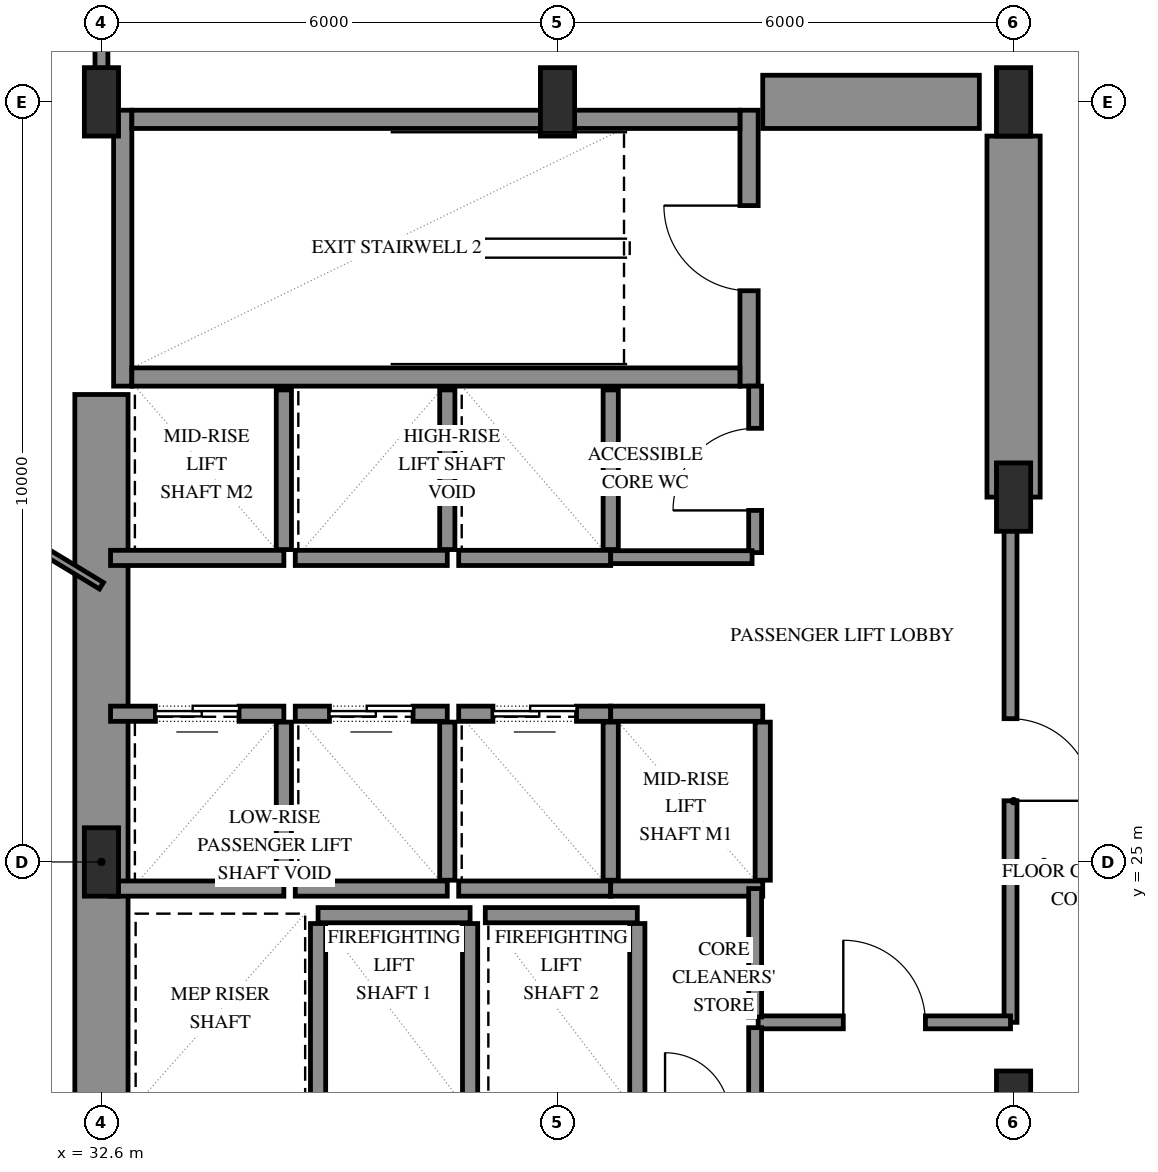
"""IFC4 building model, lengths in metres.
Left out: names, types, materials, properties, quantities, classifications, styles, units other than length and angle.
Written with IfcOpenShell. Run it as: python <this file> out.ifc"""

import sys

from ifc_helpers import new_model, si_unit, direction, frame, frame_2d, origin, origin_2d, place, context, subcontext, project, spatial, rectangle, extrude, element, fill, save


model = new_model("IFC4")
c1 = context("Model", 3, precision=1e-05, world=origin(), true_north=direction((0.0, 1.0)))
c2 = subcontext(c1, "Body", "Model", "MODEL_VIEW")
j1 = project(units=[si_unit("LENGTHUNIT", "METRE"), si_unit("PLANEANGLEUNIT", "RADIAN")], contexts=[c1])
p1 = place(None, origin())
s1 = spatial("IfcSite", under=j1, at=p1, CompositionType="ELEMENT")
p2 = place(p1, origin())
s2 = spatial("IfcBuilding", under=s1, at=p2, CompositionType="ELEMENT")
p3 = place(p2, frame((0.0, 0.0, 30.6)))
s3 = spatial("IfcBuildingStorey", under=s2, at=p3, CompositionType="ELEMENT", Elevation=30.6)
p4 = place(p3, frame((32.88, 31.26, 0.0), z_axis=(0.0, 0.0, 1.0), x_axis=(0.0, 1.0, 0.0)))
e1 = element("IfcWall", 1, at=p4, inside=s3, PredefinedType="SHEAR", context=c2, shape_type="SweptSolid", body=[
    extrude(rectangle(XDim=3.63, YDim=0.24, at=frame_2d((1.815, 0.0))), origin(), (0.0, 0.0, 1.0), 4.0),
])
p5 = place(p3, frame((41.12, 31.26, 0.0), z_axis=(0.0, 0.0, 1.0), x_axis=(0.0, 1.0, 0.0)))
e2 = element("IfcWall", 2, at=p5, inside=s3, PredefinedType="SHEAR", context=c2, shape_type="SweptSolid", body=[
    extrude(rectangle(XDim=3.63, YDim=0.24, at=frame_2d((1.815, 0.0))), origin(), (0.0, 0.0, 1.0), 4.0),
])
p6 = place(p5, frame((1.255, 0.0, 0.0)))
e3 = element("IfcOpeningElement", 3, at=p6, cuts=e2, PredefinedType="OPENING", context=c2, shape_type="SweptSolid", body=[
    extrude(rectangle(XDim=1.12, YDim=2.15, at=frame_2d((0.56, 1.075))), frame((0.0, 0.13, 0.0), z_axis=(0.0, -1.0, 0.0), x_axis=(1.0, 0.0, 0.0)), (0.0, 0.0, 1.0), 0.26),
])
for number, where, z_axis, x_axis in (
    (4, (33.0, 31.38, 0.0), (0.0, 0.0, 1.0), (1.0, 0.0, 0.0)),
    (5, (33.0, 34.77, 0.0), (0.0, 0.0, 1.0), (1.0, 0.0, 0.0)),
):
    element("IfcWall", number, at=place(p3, frame(where, z_axis=z_axis, x_axis=x_axis)), inside=s3, PredefinedType="SHEAR", context=c2, shape_type="SweptSolid", body=[
        extrude(rectangle(XDim=8.0, YDim=0.24, at=frame_2d((4.0, 0.0))), origin(), (0.0, 0.0, 1.0), 4.0),
    ])
p7 = place(p3, frame((32.6, 18.85, 0.0), z_axis=(0.0, 0.0, 1.0), x_axis=(0.0, 1.0, 0.0)))
e6 = element("IfcWall", 6, at=p7, inside=s3, PredefinedType="SHEAR", context=c2, shape_type="SweptSolid", body=[
    extrude(rectangle(XDim=12.3, YDim=0.7, at=frame_2d((6.15, 0.0))), origin(), (0.0, 0.0, 1.0), 4.0),
])
p8 = place(p3, frame((41.3, 35.0, 0.0), z_axis=(0.0, 0.0, 1.0), x_axis=(1.0, 0.0, 0.0)))
e7 = element("IfcWall", 7, at=p8, inside=s3, PredefinedType="SHEAR", context=c2, shape_type="SweptSolid", body=[
    extrude(rectangle(XDim=2.85, YDim=0.7, at=frame_2d((1.425, 0.0))), origin(), (0.0, 0.0, 1.0), 4.0),
])
p9 = place(p3, frame((44.6, 29.8, 0.0), z_axis=(0.0, 0.0, 1.0), x_axis=(0.0, 1.0, 0.0)))
e8 = element("IfcWall", 8, at=p9, inside=s3, PredefinedType="SHEAR", context=c2, shape_type="SweptSolid", body=[
    extrude(rectangle(XDim=4.75, YDim=0.7, at=frame_2d((2.375, 0.0))), origin(), (0.0, 0.0, 1.0), 4.0),
])
for number, where, z_axis, x_axis in (
    (9, (32.6, 25.0, -0.3), (0.0, 0.0, 1.0), (1.0, 0.0, 0.0)),
    (10, (32.6, 35.0, -0.3), (0.0, 0.0, 1.0), (1.0, 0.0, 0.0)),
    (11, (38.6, 35.0, -0.3), (0.0, 0.0, 1.0), (1.0, 0.0, 0.0)),
    (12, (44.6, 21.8, -0.3), (0.0, 0.0, 1.0), (1.0, 0.0, 0.0)),
    (13, (44.6, 29.8, -0.3), (0.0, 0.0, 1.0), (1.0, 0.0, 0.0)),
    (14, (44.6, 35.0, -0.3), (0.0, 0.0, 1.0), (1.0, 0.0, 0.0)),
):
    element("IfcColumn", number, at=place(p3, frame(where, z_axis=z_axis, x_axis=x_axis)), inside=s3, PredefinedType="PILASTER", context=c2, shape_type="SweptSolid", body=[
        extrude(rectangle(XDim=0.45, YDim=0.9, at=origin_2d()), origin(), (0.0, 0.0, 1.0), 4.3),
    ])
p10 = place(p3, frame((35.45, 24.3, 0.0), z_axis=(0.0, 0.0, 1.0), x_axis=(1.0, 0.0, 0.0)))
e15 = element("IfcWall", 15, at=p10, inside=s3, PredefinedType="SOLIDWALL", context=c2, shape_type="SweptSolid", body=[
    extrude(rectangle(XDim=2.0, YDim=0.2, at=frame_2d((1.0, 0.0))), origin(), (0.0, 0.0, 1.0), 3.7),
])
for number, where, z_axis, x_axis in (
    (16, (35.45, 21.81, 0.0), (0.0, 0.0, 1.0), (0.0, 1.0, 0.0)),
    (17, (37.45, 21.81, 0.0), (0.0, 0.0, 1.0), (0.0, 1.0, 0.0)),
):
    element("IfcWall", number, at=place(p3, frame(where, z_axis=z_axis, x_axis=x_axis)), inside=s3, PredefinedType="SOLIDWALL", context=c2, shape_type="SweptSolid", body=[
        extrude(rectangle(XDim=2.38, YDim=0.2, at=frame_2d((1.19, 0.0))), origin(), (0.0, 0.0, 1.0), 3.7),
    ])
p11 = place(p3, frame((37.65, 24.3, 0.0), z_axis=(0.0, 0.0, 1.0), x_axis=(1.0, 0.0, 0.0)))
e18 = element("IfcWall", 18, at=p11, inside=s3, PredefinedType="SOLIDWALL", context=c2, shape_type="SweptSolid", body=[
    extrude(rectangle(XDim=2.0, YDim=0.2, at=frame_2d((1.0, 0.0))), origin(), (0.0, 0.0, 1.0), 3.7),
])
p12 = place(p3, frame((39.65, 21.81, 0.0), z_axis=(0.0, 0.0, 1.0), x_axis=(0.0, 1.0, 0.0)))
e19 = element("IfcWall", 19, at=p12, inside=s3, PredefinedType="SOLIDWALL", context=c2, shape_type="SweptSolid", body=[
    extrude(rectangle(XDim=2.38, YDim=0.2, at=frame_2d((1.19, 0.0))), origin(), (0.0, 0.0, 1.0), 3.7),
])
p13 = place(p3, frame((32.72, 24.65, 0.0), z_axis=(0.0, 0.0, 1.0), x_axis=(1.0, 0.0, 0.0)))
e20 = element("IfcWall", 20, at=p13, inside=s3, PredefinedType="SOLIDWALL", context=c2, shape_type="SweptSolid", body=[
    extrude(rectangle(XDim=2.28, YDim=0.2, at=frame_2d((1.14, 0.0))), origin(), (0.0, 0.0, 1.0), 3.7),
])
p14 = place(p3, frame((32.72, 26.95, 0.0), z_axis=(0.0, 0.0, 1.0), x_axis=(1.0, 0.0, 0.0)))
e21 = element("IfcWall", 21, at=p14, inside=s3, PredefinedType="SOLIDWALL", context=c2, shape_type="SweptSolid", body=[
    extrude(rectangle(XDim=2.28, YDim=0.2, at=frame_2d((1.14, 0.0))), origin(), (0.0, 0.0, 1.0), 3.7),
])
p15 = place(p14, frame((0.59, 0.0, 0.0)))
e22 = element("IfcOpeningElement", 22, at=p15, cuts=e21, PredefinedType="OPENING", context=c2, shape_type="SweptSolid", body=[
    extrude(rectangle(XDim=1.1, YDim=2.15, at=frame_2d((0.55, 1.075))), frame((0.0, 0.11, 0.0), z_axis=(0.0, -1.0, 0.0), x_axis=(1.0, 0.0, 0.0)), (0.0, 0.0, 1.0), 0.22),
])
p16 = place(p3, frame((35.0, 24.76, 0.0), z_axis=(0.0, 0.0, 1.0), x_axis=(0.0, 1.0, 0.0)))
e23 = element("IfcWall", 23, at=p16, inside=s3, PredefinedType="SOLIDWALL", context=c2, shape_type="SweptSolid", body=[
    extrude(rectangle(XDim=2.08, YDim=0.2, at=frame_2d((1.04, 0.0))), origin(), (0.0, 0.0, 1.0), 3.7),
])
p17 = place(p3, frame((35.15, 24.65, 0.0), z_axis=(0.0, 0.0, 1.0), x_axis=(1.0, 0.0, 0.0)))
e24 = element("IfcWall", 24, at=p17, inside=s3, PredefinedType="SOLIDWALL", context=c2, shape_type="SweptSolid", body=[
    extrude(rectangle(XDim=2.0, YDim=0.2, at=frame_2d((1.0, 0.0))), origin(), (0.0, 0.0, 1.0), 3.7),
])
p18 = place(p3, frame((35.15, 26.95, 0.0), z_axis=(0.0, 0.0, 1.0), x_axis=(1.0, 0.0, 0.0)))
e25 = element("IfcWall", 25, at=p18, inside=s3, PredefinedType="SOLIDWALL", context=c2, shape_type="SweptSolid", body=[
    extrude(rectangle(XDim=2.0, YDim=0.2, at=frame_2d((1.0, 0.0))), origin(), (0.0, 0.0, 1.0), 3.7),
])
p19 = place(p18, frame((0.45, 0.0, 0.0)))
e26 = element("IfcOpeningElement", 26, at=p19, cuts=e25, PredefinedType="OPENING", context=c2, shape_type="SweptSolid", body=[
    extrude(rectangle(XDim=1.1, YDim=2.15, at=frame_2d((0.55, 1.075))), frame((0.0, 0.11, 0.0), z_axis=(0.0, -1.0, 0.0), x_axis=(1.0, 0.0, 0.0)), (0.0, 0.0, 1.0), 0.22),
])
p20 = place(p3, frame((37.15, 24.76, 0.0), z_axis=(0.0, 0.0, 1.0), x_axis=(0.0, 1.0, 0.0)))
e27 = element("IfcWall", 27, at=p20, inside=s3, PredefinedType="SOLIDWALL", context=c2, shape_type="SweptSolid", body=[
    extrude(rectangle(XDim=2.08, YDim=0.2, at=frame_2d((1.04, 0.0))), origin(), (0.0, 0.0, 1.0), 3.7),
])
p21 = place(p3, frame((37.3, 24.65, 0.0), z_axis=(0.0, 0.0, 1.0), x_axis=(1.0, 0.0, 0.0)))
e28 = element("IfcWall", 28, at=p21, inside=s3, PredefinedType="SOLIDWALL", context=c2, shape_type="SweptSolid", body=[
    extrude(rectangle(XDim=2.0, YDim=0.2, at=frame_2d((1.0, 0.0))), origin(), (0.0, 0.0, 1.0), 3.7),
])
p22 = place(p3, frame((37.3, 26.95, 0.0), z_axis=(0.0, 0.0, 1.0), x_axis=(1.0, 0.0, 0.0)))
e29 = element("IfcWall", 29, at=p22, inside=s3, PredefinedType="SOLIDWALL", context=c2, shape_type="SweptSolid", body=[
    extrude(rectangle(XDim=2.0, YDim=0.2, at=frame_2d((1.0, 0.0))), origin(), (0.0, 0.0, 1.0), 3.7),
])
p23 = place(p22, frame((0.45, 0.0, 0.0)))
e30 = element("IfcOpeningElement", 30, at=p23, cuts=e29, PredefinedType="OPENING", context=c2, shape_type="SweptSolid", body=[
    extrude(rectangle(XDim=1.1, YDim=2.15, at=frame_2d((0.55, 1.075))), frame((0.0, 0.11, 0.0), z_axis=(0.0, -1.0, 0.0), x_axis=(1.0, 0.0, 0.0)), (0.0, 0.0, 1.0), 0.22),
])
p24 = place(p3, frame((39.3, 24.76, 0.0), z_axis=(0.0, 0.0, 1.0), x_axis=(0.0, 1.0, 0.0)))
e31 = element("IfcWall", 31, at=p24, inside=s3, PredefinedType="SOLIDWALL", context=c2, shape_type="SweptSolid", body=[
    extrude(rectangle(XDim=2.08, YDim=0.2, at=frame_2d((1.04, 0.0))), origin(), (0.0, 0.0, 1.0), 3.7),
])
for number, where, z_axis, x_axis in (
    (32, (39.3, 24.65, 0.0), (0.0, 0.0, 1.0), (1.0, 0.0, 0.0)),
    (33, (39.3, 26.95, 0.0), (0.0, 0.0, 1.0), (1.0, 0.0, 0.0)),
):
    element("IfcWall", number, at=place(p3, frame(where, z_axis=z_axis, x_axis=x_axis)), inside=s3, PredefinedType="SOLIDWALL", context=c2, shape_type="SweptSolid", body=[
        extrude(rectangle(XDim=2.0, YDim=0.2, at=frame_2d((1.0, 0.0))), origin(), (0.0, 0.0, 1.0), 3.7),
    ])
p25 = place(p3, frame((41.3, 24.76, 0.0), z_axis=(0.0, 0.0, 1.0), x_axis=(0.0, 1.0, 0.0)))
e34 = element("IfcWall", 34, at=p25, inside=s3, PredefinedType="SOLIDWALL", context=c2, shape_type="SweptSolid", body=[
    extrude(rectangle(XDim=2.08, YDim=0.2, at=frame_2d((1.04, 0.0))), origin(), (0.0, 0.0, 1.0), 3.7),
])
p26 = place(p3, frame((32.72, 29.0, 0.0), z_axis=(0.0, 0.0, 1.0), x_axis=(1.0, 0.0, 0.0)))
e35 = element("IfcWall", 35, at=p26, inside=s3, PredefinedType="SOLIDWALL", context=c2, shape_type="SweptSolid", body=[
    extrude(rectangle(XDim=2.28, YDim=0.2, at=frame_2d((1.14, 0.0))), origin(), (0.0, 0.0, 1.0), 3.7),
])
p27 = place(p3, frame((35.0, 29.11, 0.0), z_axis=(0.0, 0.0, 1.0), x_axis=(0.0, 1.0, 0.0)))
e36 = element("IfcWall", 36, at=p27, inside=s3, PredefinedType="SOLIDWALL", context=c2, shape_type="SweptSolid", body=[
    extrude(rectangle(XDim=2.1, YDim=0.2, at=frame_2d((1.05, 0.0))), origin(), (0.0, 0.0, 1.0), 3.7),
])
p28 = place(p3, frame((35.15, 29.0, 0.0), z_axis=(0.0, 0.0, 1.0), x_axis=(1.0, 0.0, 0.0)))
e37 = element("IfcWall", 37, at=p28, inside=s3, PredefinedType="SOLIDWALL", context=c2, shape_type="SweptSolid", body=[
    extrude(rectangle(XDim=2.0, YDim=0.2, at=frame_2d((1.0, 0.0))), origin(), (0.0, 0.0, 1.0), 3.7),
])
p29 = place(p3, frame((37.15, 29.11, 0.0), z_axis=(0.0, 0.0, 1.0), x_axis=(0.0, 1.0, 0.0)))
e38 = element("IfcWall", 38, at=p29, inside=s3, PredefinedType="SOLIDWALL", context=c2, shape_type="SweptSolid", body=[
    extrude(rectangle(XDim=2.1, YDim=0.2, at=frame_2d((1.05, 0.0))), origin(), (0.0, 0.0, 1.0), 3.7),
])
p30 = place(p3, frame((37.3, 29.0, 0.0), z_axis=(0.0, 0.0, 1.0), x_axis=(1.0, 0.0, 0.0)))
e39 = element("IfcWall", 39, at=p30, inside=s3, PredefinedType="SOLIDWALL", context=c2, shape_type="SweptSolid", body=[
    extrude(rectangle(XDim=2.0, YDim=0.2, at=frame_2d((1.0, 0.0))), origin(), (0.0, 0.0, 1.0), 3.7),
])
p31 = place(p3, frame((39.3, 29.11, 0.0), z_axis=(0.0, 0.0, 1.0), x_axis=(0.0, 1.0, 0.0)))
e40 = element("IfcWall", 40, at=p31, inside=s3, PredefinedType="SOLIDWALL", context=c2, shape_type="SweptSolid", body=[
    extrude(rectangle(XDim=2.1, YDim=0.2, at=frame_2d((1.05, 0.0))), origin(), (0.0, 0.0, 1.0), 3.7),
])
p32 = place(p3, frame((32.6, 28.634, 0.0), z_axis=(0.0, 0.0, 1.0), x_axis=(-0.855390028233, 0.517984458839, 0.0)))
e41 = element("IfcWall", 41, at=p32, inside=s3, PredefinedType="PARTITIONING", context=c2, shape_type="SweptSolid", body=[
    extrude(rectangle(XDim=7.863, YDim=0.1, at=frame_2d((3.932, 0.0))), origin(), (0.0, 0.0, 1.0), 3.074),
])
p33 = place(p3, frame((44.56, 29.8, 0.0), z_axis=(0.0, 0.0, 1.0), x_axis=(0.0, -1.0, 0.0)))
e42 = element("IfcWall", 42, at=p33, inside=s3, PredefinedType="PARTITIONING", context=c2, shape_type="SweptSolid", body=[
    extrude(rectangle(XDim=6.91, YDim=0.17, at=frame_2d((3.455, 0.0))), origin(), (0.0, 0.0, 1.0), 2.74),
])
p34 = place(p33, frame((2.915, 0.0, 0.0)))
e43 = element("IfcOpeningElement", 43, at=p34, cuts=e42, PredefinedType="OPENING", context=c2, shape_type="SweptSolid", body=[
    extrude(rectangle(XDim=1.08, YDim=2.15, at=frame_2d((0.54, 1.075))), frame((0.0, 0.095, 0.0), z_axis=(0.0, -1.0, 0.0), x_axis=(1.0, 0.0, 0.0)), (0.0, 0.0, 1.0), 0.19),
])
p35 = place(p3, frame((41.24, 22.89, 0.0), z_axis=(0.0, 0.0, 1.0), x_axis=(1.0, 0.0, 0.0)))
e44 = element("IfcWall", 44, at=p35, inside=s3, PredefinedType="PARTITIONING", context=c2, shape_type="SweptSolid", body=[
    extrude(rectangle(XDim=3.32, YDim=0.17, at=frame_2d((1.66, 0.0))), origin(), (0.0, 0.0, 1.0), 3.7),
])
p36 = place(p35, frame((1.12, 0.0, 0.0)))
e45 = element("IfcOpeningElement", 45, at=p36, cuts=e44, PredefinedType="OPENING", context=c2, shape_type="SweptSolid", body=[
    extrude(rectangle(XDim=1.08, YDim=2.15, at=frame_2d((0.54, 1.075))), frame((0.0, 0.095, 0.0), z_axis=(0.0, -1.0, 0.0), x_axis=(1.0, 0.0, 0.0)), (0.0, 0.0, 1.0), 0.19),
])
p37 = place(p3, frame((41.2, 29.07, 0.0), z_axis=(0.0, 0.0, 1.0), x_axis=(0.0, 1.0, 0.0)))
e46 = element("IfcWall", 46, at=p37, inside=s3, PredefinedType="PARTITIONING", context=c2, shape_type="SweptSolid", body=[
    extrude(rectangle(XDim=2.19, YDim=0.17, at=frame_2d((1.095, 0.0))), origin(), (0.0, 0.0, 1.0), 3.7),
])
p38 = place(p37, frame((0.555, 0.0, 0.0)))
e47 = element("IfcOpeningElement", 47, at=p38, cuts=e46, PredefinedType="OPENING", context=c2, shape_type="SweptSolid", body=[
    extrude(rectangle(XDim=1.08, YDim=2.15, at=frame_2d((0.54, 1.075))), frame((0.0, 0.095, 0.0), z_axis=(0.0, -1.0, 0.0), x_axis=(1.0, 0.0, 0.0)), (0.0, 0.0, 1.0), 0.19),
])
p39 = place(p3, frame((32.6, 35.07, 0.0), z_axis=(0.0, 0.0, 1.0), x_axis=(0.0, 1.0, 0.0)))
e48 = element("IfcWall", 48, at=p39, inside=s3, PredefinedType="PARTITIONING", context=c2, shape_type="SweptSolid", body=[
    extrude(rectangle(XDim=1.91, YDim=0.17, at=frame_2d((0.955, 0.0))), origin(), (0.0, 0.0, 1.0), 3.7),
])
p40 = place(p3, frame((39.3, 29.01, 0.0), z_axis=(0.0, 0.0, 1.0), x_axis=(1.0, 0.0, 0.0)))
e49 = element("IfcWall", 49, at=p40, inside=s3, PredefinedType="PARTITIONING", context=c2, shape_type="SweptSolid", body=[
    extrude(rectangle(XDim=1.86, YDim=0.17, at=frame_2d((0.93, 0.0))), origin(), (0.0, 0.0, 1.0), 3.7),
])
p41 = place(p3, frame((41.2, 22.96, 0.0), z_axis=(0.0, 0.0, 1.0), x_axis=(0.0, 1.0, 0.0)))
e50 = element("IfcWall", 50, at=p41, inside=s3, PredefinedType="PARTITIONING", context=c2, shape_type="SweptSolid", body=[
    extrude(rectangle(XDim=1.69, YDim=0.17, at=frame_2d((0.845, 0.0))), origin(), (0.0, 0.0, 1.0), 3.7),
])
p42 = place(p3, frame((41.2, 21.7, 0.0), z_axis=(0.0, 0.0, 1.0), x_axis=(0.0, 1.0, 0.0)))
e51 = element("IfcWall", 51, at=p42, inside=s3, PredefinedType="PARTITIONING", context=c2, shape_type="SweptSolid", body=[
    extrude(rectangle(XDim=1.12, YDim=0.17, at=frame_2d((0.56, 0.0))), origin(), (0.0, 0.0, 1.0), 3.7),
])
p43 = place(p15, origin())
e52 = element("IfcDoor", 52, at=p43, inside=s3, OperationType="SLIDING_TO_LEFT", PredefinedType="DOOR", context=c2, shape_type="SweptSolid", body=[
    extrude(rectangle(XDim=1.1, YDim=2.15, at=frame_2d((0.55, 1.075))), frame((0.0, 0.025, 0.0), z_axis=(0.0, -1.0, 0.0), x_axis=(1.0, 0.0, 0.0)), (0.0, 0.0, 1.0), 0.05),
])
fill(e22, e52)
p44 = place(p19, origin())
e53 = element("IfcDoor", 53, at=p44, inside=s3, OperationType="SLIDING_TO_LEFT", PredefinedType="DOOR", context=c2, shape_type="SweptSolid", body=[
    extrude(rectangle(XDim=1.1, YDim=2.15, at=frame_2d((0.55, 1.075))), frame((0.0, 0.025, 0.0), z_axis=(0.0, -1.0, 0.0), x_axis=(1.0, 0.0, 0.0)), (0.0, 0.0, 1.0), 0.05),
])
fill(e26, e53)
p45 = place(p23, origin())
e54 = element("IfcDoor", 54, at=p45, inside=s3, OperationType="SLIDING_TO_LEFT", PredefinedType="DOOR", context=c2, shape_type="SweptSolid", body=[
    extrude(rectangle(XDim=1.1, YDim=2.15, at=frame_2d((0.55, 1.075))), frame((0.0, 0.025, 0.0), z_axis=(0.0, -1.0, 0.0), x_axis=(1.0, 0.0, 0.0)), (0.0, 0.0, 1.0), 0.05),
])
fill(e30, e54)
p46 = place(p6, origin())
e55 = element("IfcDoor", 55, at=p46, inside=s3, OperationType="SINGLE_SWING_RIGHT", PredefinedType="DOOR", context=c2, shape_type="SweptSolid", body=[
    extrude(rectangle(XDim=1.12, YDim=2.15, at=frame_2d((0.56, 1.075))), frame((0.0, 0.025, 0.0), z_axis=(0.0, -1.0, 0.0), x_axis=(1.0, 0.0, 0.0)), (0.0, 0.0, 1.0), 0.05),
])
fill(e3, e55)
p47 = place(p34, origin())
e56 = element("IfcDoor", 56, at=p47, inside=s3, OperationType="SINGLE_SWING_RIGHT", PredefinedType="DOOR", context=c2, shape_type="SweptSolid", body=[
    extrude(rectangle(XDim=1.08, YDim=2.15, at=frame_2d((0.54, 1.075))), frame((0.0, 0.025, 0.0), z_axis=(0.0, -1.0, 0.0), x_axis=(1.0, 0.0, 0.0)), (0.0, 0.0, 1.0), 0.05),
])
fill(e43, e56)
p48 = place(p36, origin())
e57 = element("IfcDoor", 57, at=p48, inside=s3, OperationType="SINGLE_SWING_LEFT", PredefinedType="DOOR", context=c2, shape_type="SweptSolid", body=[
    extrude(rectangle(XDim=1.08, YDim=2.15, at=frame_2d((0.54, 1.075))), frame((0.0, 0.025, 0.0), z_axis=(0.0, -1.0, 0.0), x_axis=(1.0, 0.0, 0.0)), (0.0, 0.0, 1.0), 0.05),
])
fill(e45, e57)
p49 = place(p38, origin())
e58 = element("IfcDoor", 58, at=p49, inside=s3, OperationType="SINGLE_SWING_LEFT", PredefinedType="DOOR", context=c2, shape_type="SweptSolid", body=[
    extrude(rectangle(XDim=1.08, YDim=2.15, at=frame_2d((0.54, 1.075))), frame((0.0, 0.025, 0.0), z_axis=(0.0, -1.0, 0.0), x_axis=(1.0, 0.0, 0.0)), (0.0, 0.0, 1.0), 0.05),
])
fill(e47, e58)
save(model, sys.argv[1])
